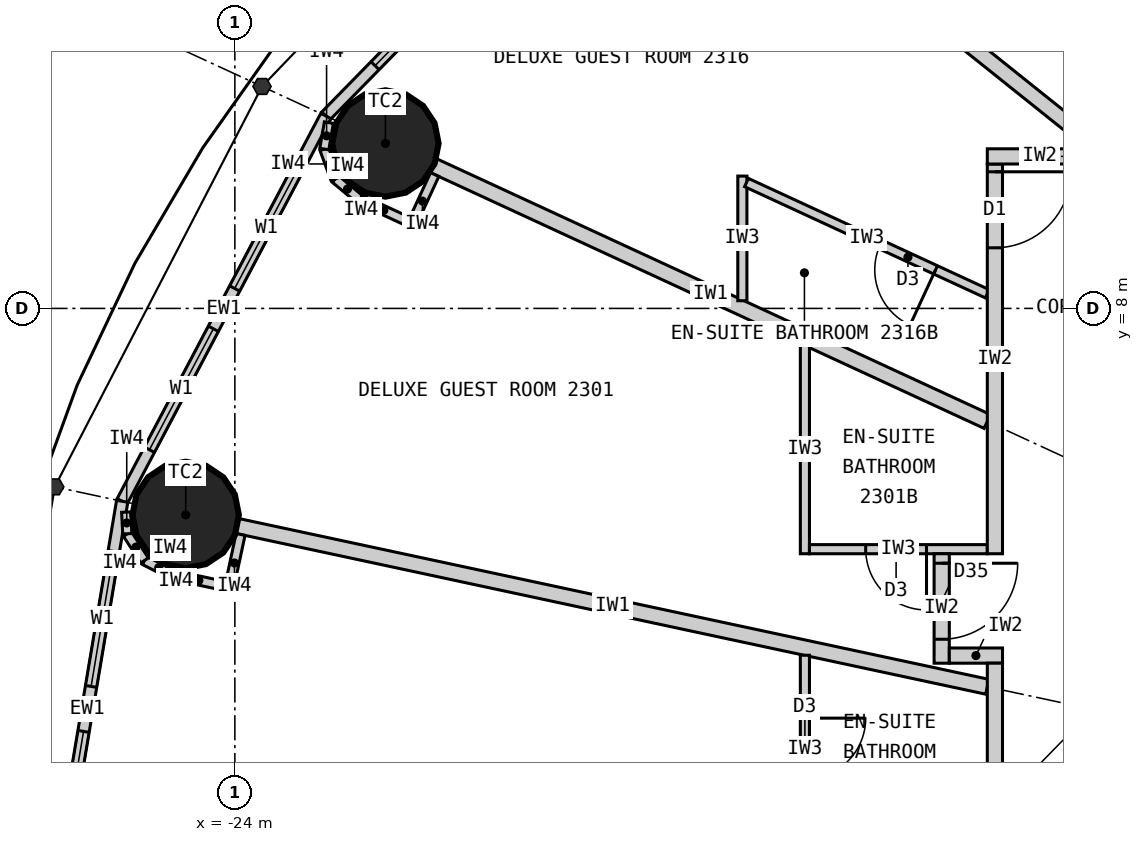
"""IFC4 building model, lengths in metres.
Left out: names, types, materials, properties, quantities, classifications, styles, units other than length and angle.
Written with IfcOpenShell. Run it as: python <this file> out.ifc"""

import sys

from ifc_helpers import new_model, si_unit, direction, frame, frame_2d, origin, origin_2d, place, context, subcontext, project, spatial, rectangle, circle, extrude, clip, halfspace, element, fill, save


model = new_model("IFC4")
c1 = context("Model", 3, precision=1e-05, world=origin(), true_north=direction((0.0, 1.0)))
c2 = subcontext(c1, "Body", "Model", "MODEL_VIEW")
j1 = project(units=[si_unit("LENGTHUNIT", "METRE"), si_unit("PLANEANGLEUNIT", "RADIAN")], contexts=[c1])
p1 = place(None, origin())
s1 = spatial("IfcSite", under=j1, at=p1, CompositionType="ELEMENT")
p2 = place(p1, origin())
s2 = spatial("IfcBuilding", under=s1, at=p2, CompositionType="ELEMENT")
p3 = place(p2, frame((0.0, 0.0, 90.3)))
s3 = spatial("IfcBuildingStorey", under=s2, at=p3, CompositionType="ELEMENT", Elevation=90.3)
for number, where, z_axis, x_axis in (
    (1, (-22.019, 10.17, 0.0), (0.0, 0.0, 1.0), (1.0, 0.0, 0.0)),
    (2, (-24.647, 5.283, 0.0), (0.0, 0.0, 1.0), (1.0, 0.0, 0.0)),
):
    element("IfcColumn", number, at=place(p3, frame(where, z_axis=z_axis, x_axis=x_axis)), inside=s3, PredefinedType="COLUMN", context=c2, shape_type="Clipping", body=[
        clip(extrude(circle(Radius=0.7, at=origin_2d()), origin(), (0.0, 0.0, 1.0), 3.3), halfspace(frame((0.0, 0.0, 2.25), z_axis=(0.0, 0.0, 1.0), x_axis=(1.0, 0.0, 0.0)), False)),
    ])
p4 = place(p3, frame((-18.57, 14.856, 0.0), z_axis=(0.0, 0.0, 1.0), x_axis=(-0.699602905915, -0.714531856557, 0.0)))
e3 = element("IfcWall", 3, at=p4, inside=s3, PredefinedType="ELEMENTEDWALL", context=c2, shape_type="SweptSolid", body=[
    extrude(rectangle(XDim=6.051, YDim=0.15, at=frame_2d((3.025, 0.0))), origin(), (0.0, 0.0, 1.0), 3.05),
])
p5 = place(p4, frame((0.926, 0.0, 0.9)))
e4 = element("IfcOpeningElement", 4, at=p5, cuts=e3, PredefinedType="OPENING", context=c2, shape_type="SweptSolid", body=[
    extrude(rectangle(XDim=1.8, YDim=1.9, at=frame_2d((0.9, 0.95))), frame((0.0, 0.085, 0.0), z_axis=(0.0, -1.0, 0.0), x_axis=(1.0, 0.0, 0.0)), (0.0, 0.0, 1.0), 0.17),
])
p6 = place(p4, frame((3.325, 0.0, 0.9)))
e5 = element("IfcOpeningElement", 5, at=p6, cuts=e3, PredefinedType="OPENING", context=c2, shape_type="SweptSolid", body=[
    extrude(rectangle(XDim=1.8, YDim=1.9, at=frame_2d((0.9, 0.95))), frame((0.0, 0.085, 0.0), z_axis=(0.0, -1.0, 0.0), x_axis=(1.0, 0.0, 0.0)), (0.0, 0.0, 1.0), 0.17),
])
p7 = place(p3, frame((-22.803, 10.532, 0.0), z_axis=(0.0, 0.0, 1.0), x_axis=(-0.467296867008, -0.884100468321, 0.0)))
e6 = element("IfcWall", 6, at=p7, inside=s3, PredefinedType="ELEMENTEDWALL", context=c2, shape_type="SweptSolid", body=[
    extrude(rectangle(XDim=5.734, YDim=0.15, at=frame_2d((2.867, 0.0))), origin(), (0.0, 0.0, 1.0), 3.05),
])
p8 = place(p7, frame((0.767, 0.0, 0.9)))
e7 = element("IfcOpeningElement", 7, at=p8, cuts=e6, PredefinedType="OPENING", context=c2, shape_type="SweptSolid", body=[
    extrude(rectangle(XDim=1.8, YDim=1.9, at=frame_2d((0.9, 0.95))), frame((0.0, 0.085, 0.0), z_axis=(0.0, -1.0, 0.0), x_axis=(1.0, 0.0, 0.0)), (0.0, 0.0, 1.0), 0.17),
])
p9 = place(p7, frame((3.167, 0.0, 0.9)))
e8 = element("IfcOpeningElement", 8, at=p9, cuts=e6, PredefinedType="OPENING", context=c2, shape_type="SweptSolid", body=[
    extrude(rectangle(XDim=1.8, YDim=1.9, at=frame_2d((0.9, 0.95))), frame((0.0, 0.085, 0.0), z_axis=(0.0, -1.0, 0.0), x_axis=(1.0, 0.0, 0.0)), (0.0, 0.0, 1.0), 0.17),
])
p10 = place(p3, frame((-25.482, 5.462, 0.0), z_axis=(0.0, 0.0, 1.0), x_axis=(-0.165642551694, -0.986185857264, 0.0)))
e9 = element("IfcWall", 9, at=p10, inside=s3, PredefinedType="ELEMENTEDWALL", context=c2, shape_type="SweptSolid", body=[
    extrude(rectangle(XDim=5.539, YDim=0.15, at=frame_2d((2.77, 0.0))), origin(), (0.0, 0.0, 1.0), 3.05),
])
p11 = place(p10, frame((0.669, 0.0, 0.9)))
e10 = element("IfcOpeningElement", 10, at=p11, cuts=e9, PredefinedType="OPENING", context=c2, shape_type="SweptSolid", body=[
    extrude(rectangle(XDim=1.8, YDim=1.9, at=frame_2d((0.9, 0.95))), frame((0.0, 0.085, 0.0), z_axis=(0.0, -1.0, 0.0), x_axis=(1.0, 0.0, 0.0)), (0.0, 0.0, 1.0), 0.17),
])
p12 = place(p10, frame((3.07, 0.0, 0.9)))
e11 = element("IfcOpeningElement", 11, at=p12, cuts=e9, PredefinedType="OPENING", context=c2, shape_type="SweptSolid", body=[
    extrude(rectangle(XDim=1.8, YDim=1.9, at=frame_2d((0.9, 0.95))), frame((0.0, 0.085, 0.0), z_axis=(0.0, -1.0, 0.0), x_axis=(1.0, 0.0, 0.0)), (0.0, 0.0, 1.0), 0.17),
])
p13 = place(p3, frame((-12.625, 10.1, 0.0), z_axis=(0.0, 0.0, 1.0), x_axis=(-0.780892451574, 0.624665493744, 0.0)))
e12 = element("IfcWall", 12, at=p13, inside=s3, PredefinedType="PARTITIONING", context=c2, shape_type="SweptSolid", body=[
    extrude(rectangle(XDim=6.045, YDim=0.2, at=frame_2d((3.022, 0.0))), origin(), (0.0, 0.0, 1.0), 2.25),
])
p14 = place(p3, frame((-14.1, 6.512, 0.0), z_axis=(0.0, 0.0, 1.0), x_axis=(-0.907832871056, 0.419332181247, 0.0)))
e13 = element("IfcWall", 13, at=p14, inside=s3, PredefinedType="PARTITIONING", context=c2, shape_type="SweptSolid", body=[
    extrude(rectangle(XDim=8.023, YDim=0.2, at=frame_2d((4.011, 0.0))), origin(), (0.0, 0.0, 1.0), 2.15),
])
p15 = place(p3, frame((-14.1, 3.022, 0.0), z_axis=(0.0, 0.0, 1.0), x_axis=(-0.977790014929, 0.209586943072, 0.0)))
e14 = element("IfcWall", 14, at=p15, inside=s3, PredefinedType="PARTITIONING", context=c2, shape_type="SweptSolid", body=[
    extrude(rectangle(XDim=10.087, YDim=0.2, at=frame_2d((5.043, 0.0))), origin(), (0.0, 0.0, 1.0), 2.05),
])
p16 = place(p3, frame((-16.5, 7.521, 0.0), z_axis=(0.0, 0.0, 1.0), x_axis=(0.0, -1.0, 0.0)))
e15 = element("IfcWall", 15, at=p16, inside=s3, PredefinedType="PARTITIONING", context=c2, shape_type="SweptSolid", body=[
    extrude(rectangle(XDim=2.749, YDim=0.12, at=frame_2d((1.374, 0.0))), origin(), (0.0, 0.0, 1.0), 3.05),
])
p17 = place(p3, frame((-14.1, 4.833, 0.0), z_axis=(0.0, 0.0, 1.0), x_axis=(-1.0, 0.0, 0.0)))
e16 = element("IfcWall", 16, at=p17, inside=s3, PredefinedType="PARTITIONING", context=c2, shape_type="SweptSolid", body=[
    extrude(rectangle(XDim=2.34, YDim=0.12, at=frame_2d((1.17, 0.0))), origin(), (0.0, 0.0, 1.0), 3.05),
])
p18 = place(p17, frame((0.8, 0.0, 0.0)))
e17 = element("IfcOpeningElement", 17, at=p18, cuts=e16, PredefinedType="OPENING", context=c2, shape_type="SweptSolid", body=[
    extrude(rectangle(XDim=0.8, YDim=2.1, at=frame_2d((0.4, 1.05))), frame((0.0, 0.07, 0.0), z_axis=(0.0, -1.0, 0.0), x_axis=(1.0, 0.0, 0.0)), (0.0, 0.0, 1.0), 0.14),
])
p19 = place(p3, frame((-16.5, 3.437, 0.0), z_axis=(0.0, 0.0, 1.0), x_axis=(0.0, -1.0, 0.0)))
e18 = element("IfcWall", 18, at=p19, inside=s3, PredefinedType="PARTITIONING", context=c2, shape_type="SweptSolid", body=[
    extrude(rectangle(XDim=2.455, YDim=0.12, at=frame_2d((1.227, 0.0))), origin(), (0.0, 0.0, 1.0), 3.05),
])
p20 = place(p19, frame((0.827, 0.0, 0.0)))
e19 = element("IfcOpeningElement", 19, at=p20, cuts=e18, PredefinedType="OPENING", context=c2, shape_type="SweptSolid", body=[
    extrude(rectangle(XDim=0.8, YDim=2.1, at=frame_2d((0.4, 1.05))), frame((0.0, 0.07, 0.0), z_axis=(0.0, -1.0, 0.0), x_axis=(1.0, 0.0, 0.0)), (0.0, 0.0, 1.0), 0.14),
])
p21 = place(p3, frame((-17.323, 8.101, 0.0), z_axis=(0.0, 0.0, 1.0), x_axis=(0.0, 1.0, 0.0)))
e20 = element("IfcWall", 20, at=p21, inside=s3, PredefinedType="PARTITIONING", context=c2, shape_type="SweptSolid", body=[
    extrude(rectangle(XDim=1.64, YDim=0.12, at=frame_2d((0.82, 0.0))), origin(), (0.0, 0.0, 1.0), 3.05),
])
p22 = place(p3, frame((-14.1, 8.193, 0.0), z_axis=(0.0, 0.0, 1.0), x_axis=(-0.907836493557, 0.419324338628, 0.0)))
e21 = element("IfcWall", 21, at=p22, inside=s3, PredefinedType="PARTITIONING", context=c2, shape_type="SweptSolid", body=[
    extrude(rectangle(XDim=3.49, YDim=0.12, at=frame_2d((1.745, 0.0))), origin(), (0.0, 0.0, 1.0), 3.05),
])
p23 = place(p22, frame((0.75, 0.0, 0.0)))
e22 = element("IfcOpeningElement", 22, at=p23, cuts=e21, PredefinedType="OPENING", context=c2, shape_type="SweptSolid", body=[
    extrude(rectangle(XDim=0.8, YDim=2.1, at=frame_2d((0.4, 1.05))), frame((0.0, 0.07, 0.0), z_axis=(0.0, -1.0, 0.0), x_axis=(1.0, 0.0, 0.0)), (0.0, 0.0, 1.0), 0.14),
])
p24 = place(p3, frame((-14.7, 4.772, 0.0), z_axis=(0.0, 0.0, 1.0), x_axis=(0.0, -1.0, 0.0)))
e23 = element("IfcWall", 23, at=p24, inside=s3, PredefinedType="PARTITIONING", context=c2, shape_type="SweptSolid", body=[
    extrude(rectangle(XDim=1.44, YDim=0.2, at=frame_2d((0.72, 0.0))), origin(), (0.0, 0.0, 1.0), 3.05),
])
p25 = place(p24, frame((0.125, 0.0, 0.0)))
e24 = element("IfcOpeningElement", 24, at=p25, cuts=e23, PredefinedType="OPENING", context=c2, shape_type="SweptSolid", body=[
    extrude(rectangle(XDim=1.0, YDim=2.0, at=frame_2d((0.5, 1.0))), frame((0.0, 0.11, 0.0), z_axis=(0.0, -1.0, 0.0), x_axis=(1.0, 0.0, 0.0)), (0.0, 0.0, 1.0), 0.22),
])
p26 = place(p3, frame((-13.9, 3.433, 0.0), z_axis=(0.0, 0.0, 1.0), x_axis=(-1.0, 0.0, 0.0)))
e25 = element("IfcWall", 25, at=p26, inside=s3, PredefinedType="PARTITIONING", context=c2, shape_type="SweptSolid", body=[
    extrude(rectangle(XDim=0.7, YDim=0.2, at=frame_2d((0.35, 0.0))), origin(), (0.0, 0.0, 1.0), 2.05),
])
p27 = place(p3, frame((-14.0, 9.9, 0.0), z_axis=(0.0, 0.0, 1.0), x_axis=(0.0, -1.0, 0.0)))
e26 = element("IfcWall", 26, at=p27, inside=s3, PredefinedType="PARTITIONING", context=c2, shape_type="SweptSolid", body=[
    extrude(rectangle(XDim=5.127, YDim=0.2, at=frame_2d((2.564, 0.0))), origin(), (0.0, 0.0, 1.0), 3.05),
])
p28 = place(p27, frame((0.103, 0.0, 0.0)))
e27 = element("IfcOpeningElement", 27, at=p28, cuts=e26, PredefinedType="OPENING", context=c2, shape_type="SweptSolid", body=[
    extrude(rectangle(XDim=1.0, YDim=2.2, at=frame_2d((0.5, 1.1))), frame((0.0, 0.11, 0.0), z_axis=(0.0, -1.0, 0.0), x_axis=(1.0, 0.0, 0.0)), (0.0, 0.0, 1.0), 0.22),
])
p29 = place(p3, frame((-14.0, 3.333, 0.0), z_axis=(0.0, 0.0, 1.0), x_axis=(0.0, -1.0, 0.0)))
e28 = element("IfcWall", 28, at=p29, inside=s3, PredefinedType="PARTITIONING", context=c2, shape_type="SweptSolid", body=[
    extrude(rectangle(XDim=8.792, YDim=0.2, at=frame_2d((4.396, 0.0))), origin(), (0.0, 0.0, 1.0), 3.05),
])
p30 = place(p29, frame((3.59, 0.0, 0.0)))
e29 = element("IfcOpeningElement", 29, at=p30, cuts=e28, PredefinedType="OPENING", context=c2, shape_type="SweptSolid", body=[
    extrude(rectangle(XDim=1.0, YDim=2.2, at=frame_2d((0.5, 1.1))), frame((0.0, 0.11, 0.0), z_axis=(0.0, -1.0, 0.0), x_axis=(1.0, 0.0, 0.0)), (0.0, 0.0, 1.0), 0.22),
])
p31 = place(p29, frame((5.234, 0.0, 0.0)))
e30 = element("IfcOpeningElement", 30, at=p31, cuts=e28, PredefinedType="OPENING", context=c2, shape_type="SweptSolid", body=[
    extrude(rectangle(XDim=1.0, YDim=2.2, at=frame_2d((0.5, 1.1))), frame((0.0, 0.11, 0.0), z_axis=(0.0, -1.0, 0.0), x_axis=(1.0, 0.0, 0.0)), (0.0, 0.0, 1.0), 0.22),
])
p32 = place(p3, frame((-14.1, 10.0, 0.0), z_axis=(0.0, 0.0, 1.0), x_axis=(1.0, 0.0, 0.0)))
e31 = element("IfcWall", 31, at=p32, inside=s3, PredefinedType="PARTITIONING", context=c2, shape_type="SweptSolid", body=[
    extrude(rectangle(XDim=2.481, YDim=0.2, at=frame_2d((1.24, 0.0))), origin(), (0.0, 0.0, 1.0), 3.05),
])
p33 = place(p3, frame((-21.371, 9.761, 0.0), z_axis=(0.0, 0.0, 1.0), x_axis=(-0.419259891039, -0.907866258744, 0.0)))
e32 = element("IfcWall", 32, at=p33, inside=s3, PredefinedType="PARTITIONING", context=c2, shape_type="SweptSolid", body=[
    extrude(rectangle(XDim=0.768, YDim=0.12, at=frame_2d((0.384, 0.0))), origin(), (0.0, 0.0, 1.0), 3.05),
])
p34 = place(p3, frame((-21.722, 9.144, 0.0), z_axis=(0.0, 0.0, 1.0), x_axis=(-0.907877701396, 0.419235112208, 0.0)))
e33 = element("IfcWall", 33, at=p34, inside=s3, PredefinedType="PARTITIONING", context=c2, shape_type="SweptSolid", body=[
    extrude(rectangle(XDim=0.7, YDim=0.12, at=frame_2d((0.35, 0.0))), origin(), (0.0, 0.0, 1.0), 3.05),
])
p35 = place(p3, frame((-22.358, 9.437, 0.0), z_axis=(0.0, 0.0, 1.0), x_axis=(-0.768412687942, 0.639954639806, 0.0)))
e34 = element("IfcWall", 34, at=p35, inside=s3, PredefinedType="PARTITIONING", context=c2, shape_type="SweptSolid", body=[
    extrude(rectangle(XDim=0.418, YDim=0.12, at=frame_2d((0.209, 0.0))), origin(), (0.0, 0.0, 1.0), 3.05),
])
p36 = place(p3, frame((-22.679, 9.705, 0.0), z_axis=(0.0, 0.0, 1.0), x_axis=(-0.345164001646, 0.938542386879, 0.0)))
e35 = element("IfcWall", 35, at=p36, inside=s3, PredefinedType="PARTITIONING", context=c2, shape_type="SweptSolid", body=[
    extrude(rectangle(XDim=0.418, YDim=0.12, at=frame_2d((0.209, 0.0))), origin(), (0.0, 0.0, 1.0), 3.05),
])
p37 = place(p3, frame((-22.823, 10.097, 0.0), z_axis=(0.0, 0.0, 1.0), x_axis=(0.169674995186, 0.985500074079, 0.0)))
e36 = element("IfcWall", 36, at=p37, inside=s3, PredefinedType="PARTITIONING", context=c2, shape_type="SweptSolid", body=[
    extrude(rectangle(XDim=0.353, YDim=0.12, at=frame_2d((0.176, 0.0))), origin(), (0.0, 0.0, 1.0), 3.05),
])
p38 = place(p3, frame((-23.925, 5.026, 0.0), z_axis=(0.0, 0.0, 1.0), x_axis=(-0.209681192172, -0.977769808109, 0.0)))
e37 = element("IfcWall", 37, at=p38, inside=s3, PredefinedType="PARTITIONING", context=c2, shape_type="SweptSolid", body=[
    extrude(rectangle(XDim=0.767, YDim=0.12, at=frame_2d((0.384, 0.0))), origin(), (0.0, 0.0, 1.0), 3.05),
])
p39 = place(p3, frame((-24.132, 4.347, 0.0), z_axis=(0.0, 0.0, 1.0), x_axis=(-0.977776882509, 0.209648200638, 0.0)))
e38 = element("IfcWall", 38, at=p39, inside=s3, PredefinedType="PARTITIONING", context=c2, shape_type="SweptSolid", body=[
    extrude(rectangle(XDim=0.7, YDim=0.12, at=frame_2d((0.35, 0.0))), origin(), (0.0, 0.0, 1.0), 3.05),
])
for number, where, z_axis, x_axis in (
    (39, (-24.816, 4.494, 0.0), (0.0, 0.0, 1.0), (-0.89, 0.455, 0.0)),
    (40, (-25.188, 4.684, 0.0), (0.0, 0.0, 1.0), (-0.543, 0.84, 0.0)),
):
    element("IfcWall", number, at=place(p3, frame(where, z_axis=z_axis, x_axis=x_axis)), inside=s3, PredefinedType="PARTITIONING", context=c2, shape_type="SweptSolid", body=[
        extrude(rectangle(XDim=0.418, YDim=0.12, at=frame_2d((0.209, 0.0))), origin(), (0.0, 0.0, 1.0), 3.05),
    ])
p40 = place(p3, frame((-25.416, 5.035, 0.0), z_axis=(0.0, 0.0, 1.0), x_axis=(-0.050406329159, 0.998728793007, 0.0)))
e41 = element("IfcWall", 41, at=p40, inside=s3, PredefinedType="PARTITIONING", context=c2, shape_type="SweptSolid", body=[
    extrude(rectangle(XDim=0.286, YDim=0.12, at=frame_2d((0.143, 0.0))), origin(), (0.0, 0.0, 1.0), 3.05),
])
p41 = place(p6, origin())
e42 = element("IfcWindow", 42, at=p41, inside=s3, PartitioningType="SINGLE_PANEL", PredefinedType="WINDOW", context=c2, shape_type="SweptSolid", body=[
    extrude(rectangle(XDim=1.8, YDim=1.9, at=frame_2d((0.9, 0.95))), frame((0.0, 0.03, 0.0), z_axis=(0.0, -1.0, 0.0), x_axis=(1.0, 0.0, 0.0)), (0.0, 0.0, 1.0), 0.06),
])
fill(e5, e42)
p42 = place(p8, origin())
e43 = element("IfcWindow", 43, at=p42, inside=s3, PartitioningType="SINGLE_PANEL", PredefinedType="WINDOW", context=c2, shape_type="SweptSolid", body=[
    extrude(rectangle(XDim=1.8, YDim=1.9, at=frame_2d((0.9, 0.95))), frame((0.0, 0.03, 0.0), z_axis=(0.0, -1.0, 0.0), x_axis=(1.0, 0.0, 0.0)), (0.0, 0.0, 1.0), 0.06),
])
fill(e7, e43)
p43 = place(p9, origin())
e44 = element("IfcWindow", 44, at=p43, inside=s3, PartitioningType="SINGLE_PANEL", PredefinedType="WINDOW", context=c2, shape_type="SweptSolid", body=[
    extrude(rectangle(XDim=1.8, YDim=1.9, at=frame_2d((0.9, 0.95))), frame((0.0, 0.03, 0.0), z_axis=(0.0, -1.0, 0.0), x_axis=(1.0, 0.0, 0.0)), (0.0, 0.0, 1.0), 0.06),
])
fill(e8, e44)
p44 = place(p11, origin())
e45 = element("IfcWindow", 45, at=p44, inside=s3, PartitioningType="SINGLE_PANEL", PredefinedType="WINDOW", context=c2, shape_type="SweptSolid", body=[
    extrude(rectangle(XDim=1.8, YDim=1.9, at=frame_2d((0.9, 0.95))), frame((0.0, 0.03, 0.0), z_axis=(0.0, -1.0, 0.0), x_axis=(1.0, 0.0, 0.0)), (0.0, 0.0, 1.0), 0.06),
])
fill(e10, e45)
p45 = place(p12, origin())
e46 = element("IfcWindow", 46, at=p45, inside=s3, PartitioningType="SINGLE_PANEL", PredefinedType="WINDOW", context=c2, shape_type="SweptSolid", body=[
    extrude(rectangle(XDim=1.8, YDim=1.9, at=frame_2d((0.9, 0.95))), frame((0.0, 0.03, 0.0), z_axis=(0.0, -1.0, 0.0), x_axis=(1.0, 0.0, 0.0)), (0.0, 0.0, 1.0), 0.06),
])
fill(e11, e46)
p46 = place(p18, origin())
e47 = element("IfcDoor", 47, at=p46, inside=s3, OperationType="SINGLE_SWING_LEFT", PredefinedType="DOOR", context=c2, shape_type="SweptSolid", body=[
    extrude(rectangle(XDim=0.8, YDim=2.1, at=frame_2d((0.4, 1.05))), frame((0.0, 0.025, 0.0), z_axis=(0.0, -1.0, 0.0), x_axis=(1.0, 0.0, 0.0)), (0.0, 0.0, 1.0), 0.05),
])
fill(e17, e47)
p47 = place(p25, origin())
e48 = element("IfcDoor", 48, at=p47, inside=s3, OperationType="SINGLE_SWING_LEFT", PredefinedType="DOOR", context=c2, shape_type="SweptSolid", body=[
    extrude(rectangle(XDim=1.0, YDim=2.0, at=frame_2d((0.5, 1.0))), frame((0.0, 0.025, 0.0), z_axis=(0.0, -1.0, 0.0), x_axis=(1.0, 0.0, 0.0)), (0.0, 0.0, 1.0), 0.05),
])
fill(e24, e48)
p48 = place(p20, origin())
e49 = element("IfcDoor", 49, at=p48, inside=s3, OperationType="SINGLE_SWING_LEFT", PredefinedType="DOOR", context=c2, shape_type="SweptSolid", body=[
    extrude(rectangle(XDim=0.8, YDim=2.1, at=frame_2d((0.4, 1.05))), frame((0.0, 0.025, 0.0), z_axis=(0.0, -1.0, 0.0), x_axis=(1.0, 0.0, 0.0)), (0.0, 0.0, 1.0), 0.05),
])
fill(e19, e49)
p49 = place(p23, origin())
e50 = element("IfcDoor", 50, at=p49, inside=s3, OperationType="SINGLE_SWING_LEFT", PredefinedType="DOOR", context=c2, shape_type="SweptSolid", body=[
    extrude(rectangle(XDim=0.8, YDim=2.1, at=frame_2d((0.4, 1.05))), frame((0.0, 0.025, 0.0), z_axis=(0.0, -1.0, 0.0), x_axis=(1.0, 0.0, 0.0)), (0.0, 0.0, 1.0), 0.05),
])
fill(e22, e50)
p50 = place(p28, origin())
e51 = element("IfcDoor", 51, at=p50, inside=s3, OperationType="SINGLE_SWING_LEFT", PredefinedType="DOOR", context=c2, shape_type="SweptSolid", body=[
    extrude(rectangle(XDim=1.0, YDim=2.2, at=frame_2d((0.5, 1.1))), frame((0.0, 0.025, 0.0), z_axis=(0.0, -1.0, 0.0), x_axis=(1.0, 0.0, 0.0)), (0.0, 0.0, 1.0), 0.05),
])
fill(e27, e51)
save(model, sys.argv[1])
